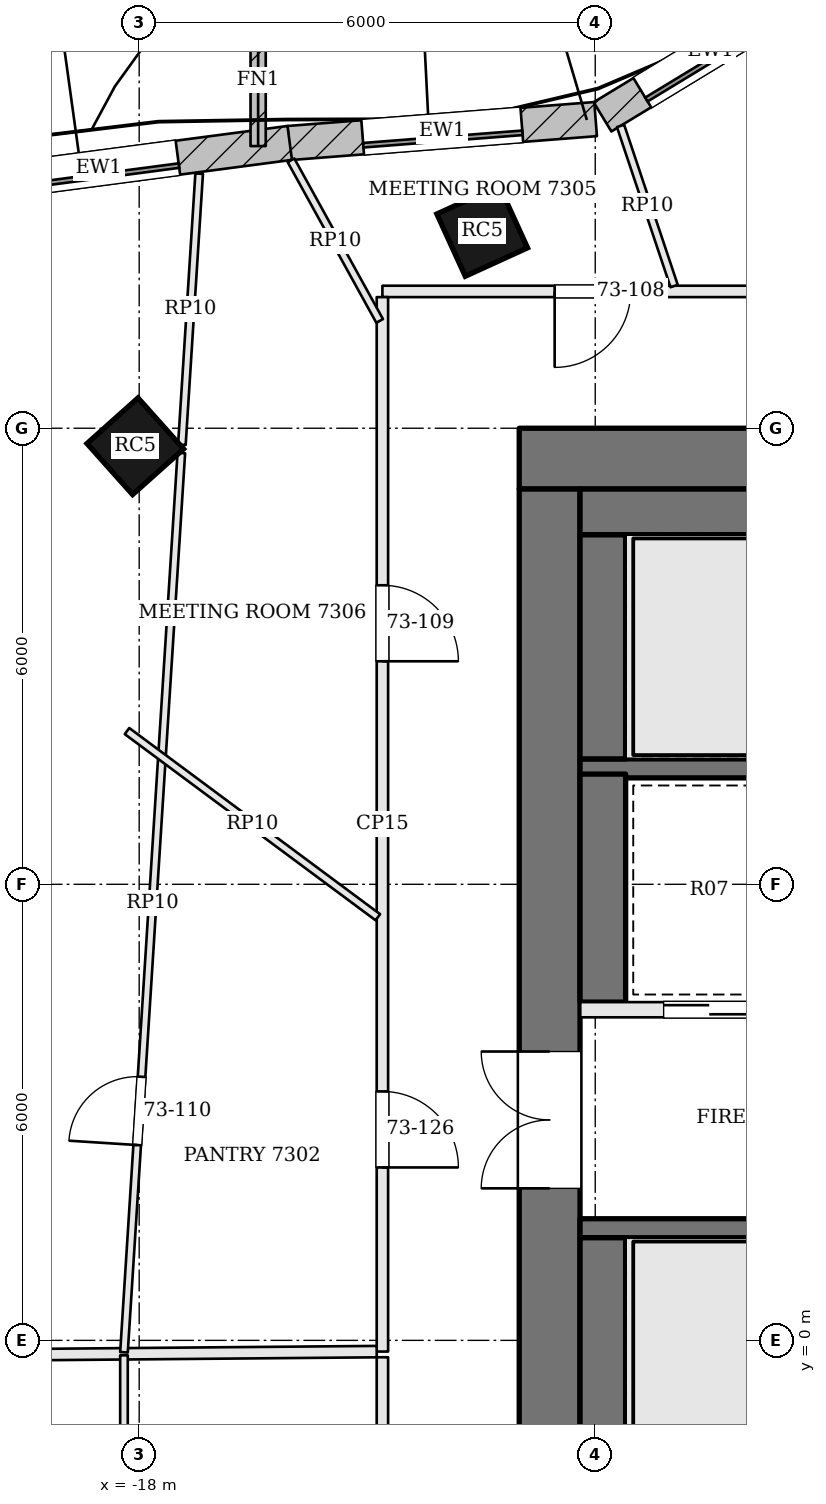
"""IFC4 building model, lengths in metres.
Left out: names, types, materials, properties, quantities, classifications, styles, units other than length and angle.
Written with IfcOpenShell. Run it as: python <this file> out.ifc"""

import sys

from ifc_helpers import new_model, si_unit, direction, frame, frame_2d, origin, origin_2d, place, context, subcontext, project, spatial, rectangle, extrude, element, fill, save


model = new_model("IFC4")
c1 = context("Model", 3, precision=1e-05, world=origin(), true_north=direction((0.0, 1.0)))
c2 = subcontext(c1, "Body", "Model", "MODEL_VIEW")
j1 = project(units=[si_unit("LENGTHUNIT", "METRE"), si_unit("PLANEANGLEUNIT", "RADIAN")], contexts=[c1])
p1 = place(None, origin())
s1 = spatial("IfcSite", under=j1, at=p1, CompositionType="ELEMENT")
p2 = place(p1, origin())
s2 = spatial("IfcBuilding", under=s1, at=p2, CompositionType="ELEMENT")
p3 = place(p2, frame((0.0, 0.0, 296.1)))
s3 = spatial("IfcBuildingStorey", under=s2, at=p3, CompositionType="ELEMENT", Elevation=296.1)
p4 = place(p3, frame((-13.0, 11.6, 0.0), z_axis=(0.0, 0.0, 1.0), x_axis=(1.0, 0.0, 0.0)))
e1 = element("IfcWall", 1, at=p4, inside=s3, PredefinedType="SHEAR", context=c2, shape_type="SweptSolid", body=[
    extrude(rectangle(XDim=26.0, YDim=0.8, at=frame_2d((13.0, 0.0))), origin(), (0.0, 0.0, 1.0), 3.9),
])
p5 = place(p4, frame((8.825, 0.0, 0.0)))
e2 = element("IfcOpeningElement", 2, at=p5, cuts=e1, PredefinedType="OPENING", context=c2, shape_type="SweptSolid", body=[
    extrude(rectangle(XDim=1.0, YDim=2.1, at=frame_2d((0.5, 1.05))), frame((0.0, 0.41, 0.0), z_axis=(0.0, -1.0, 0.0), x_axis=(1.0, 0.0, 0.0)), (0.0, 0.0, 1.0), 0.82),
])
p6 = place(p4, frame((11.825, 0.0, 0.0)))
e3 = element("IfcOpeningElement", 3, at=p6, cuts=e1, PredefinedType="OPENING", context=c2, shape_type="SweptSolid", body=[
    extrude(rectangle(XDim=0.7, YDim=2.1, at=frame_2d((0.35, 1.05))), frame((0.0, 0.41, 0.0), z_axis=(0.0, -1.0, 0.0), x_axis=(1.0, 0.0, 0.0)), (0.0, 0.0, 1.0), 0.82),
])
p7 = place(p4, frame((14.275, 0.0, 0.0)))
e4 = element("IfcOpeningElement", 4, at=p7, cuts=e1, PredefinedType="OPENING", context=c2, shape_type="SweptSolid", body=[
    extrude(rectangle(XDim=0.7, YDim=2.1, at=frame_2d((0.35, 1.05))), frame((0.0, 0.41, 0.0), z_axis=(0.0, -1.0, 0.0), x_axis=(1.0, 0.0, 0.0)), (0.0, 0.0, 1.0), 0.82),
])
p8 = place(p4, frame((16.175, 0.0, 0.0)))
e5 = element("IfcOpeningElement", 5, at=p8, cuts=e1, PredefinedType="OPENING", context=c2, shape_type="SweptSolid", body=[
    extrude(rectangle(XDim=1.0, YDim=2.1, at=frame_2d((0.5, 1.05))), frame((0.0, 0.41, 0.0), z_axis=(0.0, -1.0, 0.0), x_axis=(1.0, 0.0, 0.0)), (0.0, 0.0, 1.0), 0.82),
])
p9 = place(p3, frame((-12.6, -2.2, 0.0), z_axis=(0.0, 0.0, 1.0), x_axis=(0.0, 1.0, 0.0)))
e6 = element("IfcWall", 6, at=p9, inside=s3, PredefinedType="SHEAR", context=c2, shape_type="SweptSolid", body=[
    extrude(rectangle(XDim=13.4, YDim=0.8, at=frame_2d((6.7, 0.0))), origin(), (0.0, 0.0, 1.0), 3.9),
])
p10 = place(p9, frame((4.2, 0.0, 0.0)))
e7 = element("IfcOpeningElement", 7, at=p10, cuts=e6, PredefinedType="OPENING", context=c2, shape_type="SweptSolid", body=[
    extrude(rectangle(XDim=1.8, YDim=2.1, at=frame_2d((0.9, 1.05))), frame((0.0, 0.41, 0.0), z_axis=(0.0, -1.0, 0.0), x_axis=(1.0, 0.0, 0.0)), (0.0, 0.0, 1.0), 0.82),
])
for number, where, z_axis, x_axis in (
    (8, (-13.487, 14.596, 0.0), (0.0, 0.0, 1.0), (-0.91, -0.415, 0.0)),
    (9, (-18.051, 11.763, 0.0), (0.0, 0.0, 1.0), (-0.746, -0.666, 0.0)),
):
    element("IfcColumn", number, at=place(p3, frame(where, z_axis=z_axis, x_axis=x_axis)), inside=s3, PredefinedType="COLUMN", context=c2, shape_type="SweptSolid", body=[
        extrude(rectangle(XDim=0.9, YDim=0.9, at=origin_2d()), origin(), (0.0, 0.0, 1.0), 3.9),
    ])
p11 = place(p3, frame((-9.063, 17.823, 0.0), z_axis=(0.0, 0.0, 1.0), x_axis=(-0.854622263029, -0.519250216693, 0.0)))
e10 = element("IfcWall", 10, at=p11, inside=s3, PredefinedType="SOLIDWALL", context=c2, shape_type="SweptSolid", body=[
    extrude(rectangle(XDim=3.325, YDim=0.45, at=frame_2d((1.662, 0.0))), origin(), (0.0, 0.0, 1.0), 3.7),
])
p12 = place(p11, frame((0.612, 0.0, 0.9)))
e11 = element("IfcOpeningElement", 11, at=p12, cuts=e10, PredefinedType="OPENING", context=c2, shape_type="SweptSolid", body=[
    extrude(rectangle(XDim=2.1, YDim=2.3, at=frame_2d((1.05, 1.15))), frame((0.0, 0.235, 0.0), z_axis=(0.0, -1.0, 0.0), x_axis=(1.0, 0.0, 0.0)), (0.0, 0.0, 1.0), 0.47),
])
p13 = place(p3, frame((-11.995, 16.067, 0.0), z_axis=(0.0, 0.0, 1.0), x_axis=(-0.996967993416, -0.077812724559, 0.0)))
e12 = element("IfcWall", 12, at=p13, inside=s3, PredefinedType="SOLIDWALL", context=c2, shape_type="SweptSolid", body=[
    extrude(rectangle(XDim=4.047, YDim=0.45, at=frame_2d((2.024, 0.0))), origin(), (0.0, 0.0, 1.0), 3.7),
])
p14 = place(p13, frame((0.974, 0.0, 0.9)))
e13 = element("IfcOpeningElement", 13, at=p14, cuts=e12, PredefinedType="OPENING", context=c2, shape_type="SweptSolid", body=[
    extrude(rectangle(XDim=2.1, YDim=2.3, at=frame_2d((1.05, 1.15))), frame((0.0, 0.235, 0.0), z_axis=(0.0, -1.0, 0.0), x_axis=(1.0, 0.0, 0.0)), (0.0, 0.0, 1.0), 0.47),
])
p15 = place(p3, frame((-16.019, 15.753, 0.0), z_axis=(0.0, 0.0, 1.0), x_axis=(-0.991409967396, -0.130790965086, 0.0)))
e14 = element("IfcWall", 14, at=p15, inside=s3, PredefinedType="SOLIDWALL", context=c2, shape_type="SweptSolid", body=[
    extrude(rectangle(XDim=5.068, YDim=0.45, at=frame_2d((2.534, 0.0))), origin(), (0.0, 0.0, 1.0), 3.7),
])
p16 = place(p15, frame((1.484, 0.0, 0.9)))
e15 = element("IfcOpeningElement", 15, at=p16, cuts=e14, PredefinedType="OPENING", context=c2, shape_type="SweptSolid", body=[
    extrude(rectangle(XDim=2.1, YDim=2.3, at=frame_2d((1.05, 1.15))), frame((0.0, 0.235, 0.0), z_axis=(0.0, -1.0, 0.0), x_axis=(1.0, 0.0, 0.0)), (0.0, 0.0, 1.0), 0.47),
])
p17 = place(p3, frame((-16.435, 15.712, 0.0), z_axis=(0.0, 0.0, 1.0), x_axis=(0.000279017846, 0.999999961075, 0.0)))
e16 = element("IfcWall", 16, at=p17, inside=s3, PredefinedType="SOLIDWALL", context=c2, shape_type="SweptSolid", body=[
    extrude(rectangle(XDim=1.75, YDim=0.2, at=frame_2d((0.875, 0.0))), origin(), (0.0, 0.0, 1.0), 3.7),
])
p18 = place(p3, frame((-12.2, 1.475, 0.0), z_axis=(0.0, 0.0, 1.0), x_axis=(1.0, 0.0, 0.0)))
e17 = element("IfcWall", 17, at=p18, inside=s3, PredefinedType="SOLIDWALL", context=c2, shape_type="SweptSolid", body=[
    extrude(rectangle(XDim=7.1, YDim=0.25, at=frame_2d((3.55, 0.0))), origin(), (0.0, 0.0, 1.0), 3.7),
])
p19 = place(p18, frame((5.8, 0.0, 0.0)))
e18 = element("IfcOpeningElement", 18, at=p19, cuts=e17, PredefinedType="OPENING", context=c2, shape_type="SweptSolid", body=[
    extrude(rectangle(XDim=1.2, YDim=2.1, at=frame_2d((0.6, 1.05))), frame((0.0, 0.135, 0.0), z_axis=(0.0, -1.0, 0.0), x_axis=(1.0, 0.0, 0.0)), (0.0, 0.0, 1.0), 0.27),
])
p20 = place(p3, frame((-12.2, 4.35, 0.0), z_axis=(0.0, 0.0, 1.0), x_axis=(1.0, 0.0, 0.0)))
e19 = element("IfcWall", 19, at=p20, inside=s3, PredefinedType="SOLIDWALL", context=c2, shape_type="SweptSolid", body=[
    extrude(rectangle(XDim=7.1, YDim=0.2, at=frame_2d((3.55, 0.0))), origin(), (0.0, 0.0, 1.0), 3.7),
])
p21 = place(p20, frame((4.4, 0.0, 0.0)))
e20 = element("IfcOpeningElement", 20, at=p21, cuts=e19, PredefinedType="OPENING", context=c2, shape_type="SweptSolid", body=[
    extrude(rectangle(XDim=1.2, YDim=2.1, at=frame_2d((0.6, 1.05))), frame((0.0, 0.11, 0.0), z_axis=(0.0, -1.0, 0.0), x_axis=(1.0, 0.0, 0.0)), (0.0, 0.0, 1.0), 0.22),
])
p22 = place(p20, frame((1.1, 0.0, 0.0)))
e21 = element("IfcOpeningElement", 21, at=p22, cuts=e19, PredefinedType="OPENING", context=c2, shape_type="SweptSolid", body=[
    extrude(rectangle(XDim=1.2, YDim=2.1, at=frame_2d((0.6, 1.05))), frame((0.0, 0.11, 0.0), z_axis=(0.0, -1.0, 0.0), x_axis=(1.0, 0.0, 0.0)), (0.0, 0.0, 1.0), 0.22),
])
p23 = place(p3, frame((-12.2, 7.525, 0.0), z_axis=(0.0, 0.0, 1.0), x_axis=(1.0, 0.0, 0.0)))
e22 = element("IfcWall", 22, at=p23, inside=s3, PredefinedType="SOLIDWALL", context=c2, shape_type="SweptSolid", body=[
    extrude(rectangle(XDim=7.1, YDim=0.25, at=frame_2d((3.55, 0.0))), origin(), (0.0, 0.0, 1.0), 3.7),
])
p24 = place(p23, frame((5.8, 0.0, 0.0)))
e23 = element("IfcOpeningElement", 23, at=p24, cuts=e22, PredefinedType="OPENING", context=c2, shape_type="SweptSolid", body=[
    extrude(rectangle(XDim=1.2, YDim=2.1, at=frame_2d((0.6, 1.05))), frame((0.0, 0.135, 0.0), z_axis=(0.0, -1.0, 0.0), x_axis=(1.0, 0.0, 0.0)), (0.0, 0.0, 1.0), 0.27),
])
p25 = place(p3, frame((-11.9, -1.6, 0.0), z_axis=(0.0, 0.0, 1.0), x_axis=(0.0, 1.0, 0.0)))
e24 = element("IfcWall", 24, at=p25, inside=s3, PredefinedType="SOLIDWALL", context=c2, shape_type="SweptSolid", body=[
    extrude(rectangle(XDim=2.95, YDim=0.6, at=frame_2d((1.475, 0.0))), origin(), (0.0, 0.0, 1.0), 3.7),
])
p26 = place(p3, frame((-11.9, 4.45, 0.0), z_axis=(0.0, 0.0, 1.0), x_axis=(0.0, 1.0, 0.0)))
e25 = element("IfcWall", 25, at=p26, inside=s3, PredefinedType="SOLIDWALL", context=c2, shape_type="SweptSolid", body=[
    extrude(rectangle(XDim=3.0, YDim=0.6, at=frame_2d((1.5, 0.0))), origin(), (0.0, 0.0, 1.0), 3.7),
])
p27 = place(p3, frame((-11.9, 7.65, 0.0), z_axis=(0.0, 0.0, 1.0), x_axis=(0.0, 1.0, 0.0)))
e26 = element("IfcWall", 26, at=p27, inside=s3, PredefinedType="SOLIDWALL", context=c2, shape_type="SweptSolid", body=[
    extrude(rectangle(XDim=2.95, YDim=0.6, at=frame_2d((1.475, 0.0))), origin(), (0.0, 0.0, 1.0), 3.7),
])
p28 = place(p3, frame((-12.2, 10.9, 0.0), z_axis=(0.0, 0.0, 1.0), x_axis=(1.0, 0.0, 0.0)))
e27 = element("IfcWall", 27, at=p28, inside=s3, PredefinedType="SOLIDWALL", context=c2, shape_type="SweptSolid", body=[
    extrude(rectangle(XDim=7.1, YDim=0.6, at=frame_2d((3.55, 0.0))), origin(), (0.0, 0.0, 1.0), 3.7),
])
p29 = place(p3, frame((-0.184, 13.8, 0.0), z_axis=(0.0, 0.0, 1.0), x_axis=(-1.0, 0.0, 0.0)))
e28 = element("IfcWall", 28, at=p29, inside=s3, PredefinedType="PARTITIONING", context=c2, shape_type="SweptSolid", body=[
    extrude(rectangle(XDim=14.616, YDim=0.15, at=frame_2d((7.308, 0.0))), origin(), (0.0, 0.0, 1.0), 3.198),
])
p30 = place(p29, frame((4.44, 0.0, 0.0)))
e29 = element("IfcOpeningElement", 29, at=p30, cuts=e28, PredefinedType="OPENING", context=c2, shape_type="SweptSolid", body=[
    extrude(rectangle(XDim=1.8, YDim=2.1, at=frame_2d((0.9, 1.05))), frame((0.0, 0.085, 0.0), z_axis=(0.0, -1.0, 0.0), x_axis=(1.0, 0.0, 0.0)), (0.0, 0.0, 1.0), 0.17),
])
p31 = place(p29, frame((11.35, 0.0, 0.0)))
e30 = element("IfcOpeningElement", 30, at=p31, cuts=e28, PredefinedType="OPENING", context=c2, shape_type="SweptSolid", body=[
    extrude(rectangle(XDim=1.0, YDim=2.4, at=frame_2d((0.5, 1.2))), frame((0.0, 0.085, 0.0), z_axis=(0.0, -1.0, 0.0), x_axis=(1.0, 0.0, 0.0)), (0.0, 0.0, 1.0), 0.17),
])
p32 = place(p3, frame((-14.8, 13.725, 0.0), z_axis=(0.0, 0.0, 1.0), x_axis=(0.0, -1.0, 0.0)))
e31 = element("IfcWall", 31, at=p32, inside=s3, PredefinedType="PARTITIONING", context=c2, shape_type="SweptSolid", body=[
    extrude(rectangle(XDim=13.872, YDim=0.15, at=frame_2d((6.936, 0.0))), origin(), (0.0, 0.0, 1.0), 3.198),
])
p33 = place(p32, frame((3.791, 0.0, 0.0)))
e32 = element("IfcOpeningElement", 32, at=p33, cuts=e31, PredefinedType="OPENING", context=c2, shape_type="SweptSolid", body=[
    extrude(rectangle(XDim=1.0, YDim=2.4, at=frame_2d((0.5, 1.2))), frame((0.0, 0.085, 0.0), z_axis=(0.0, -1.0, 0.0), x_axis=(1.0, 0.0, 0.0)), (0.0, 0.0, 1.0), 0.17),
])
p34 = place(p32, frame((10.45, 0.0, 0.0)))
e33 = element("IfcOpeningElement", 33, at=p34, cuts=e31, PredefinedType="OPENING", context=c2, shape_type="SweptSolid", body=[
    extrude(rectangle(XDim=1.0, YDim=2.1, at=frame_2d((0.5, 1.05))), frame((0.0, 0.085, 0.0), z_axis=(0.0, -1.0, 0.0), x_axis=(1.0, 0.0, 0.0)), (0.0, 0.0, 1.0), 0.17),
])
p35 = place(p3, frame((-24.384, -0.231, 0.0), z_axis=(0.0, 0.0, 1.0), x_axis=(0.999962123102, 0.008703583232, 0.0)))
e34 = element("IfcWall", 34, at=p35, inside=s3, PredefinedType="PARTITIONING", context=c2, shape_type="SweptSolid", body=[
    extrude(rectangle(XDim=9.509, YDim=0.15, at=frame_2d((4.754, 0.0))), origin(), (0.0, 0.0, 1.0), 3.234),
])
p36 = place(p3, frame((-14.8, -0.222, 0.0), z_axis=(0.0, 0.0, 1.0), x_axis=(0.0, -1.0, 0.0)))
e35 = element("IfcWall", 35, at=p36, inside=s3, PredefinedType="PARTITIONING", context=c2, shape_type="SweptSolid", body=[
    extrude(rectangle(XDim=4.578, YDim=0.15, at=frame_2d((2.289, 0.0))), origin(), (0.0, 0.0, 1.0), 3.198),
])
p37 = place(p36, frame((1.24, 0.0, 0.0)))
e36 = element("IfcOpeningElement", 36, at=p37, cuts=e35, PredefinedType="OPENING", context=c2, shape_type="SweptSolid", body=[
    extrude(rectangle(XDim=1.0, YDim=2.1, at=frame_2d((0.5, 1.05))), frame((0.0, 0.085, 0.0), z_axis=(0.0, -1.0, 0.0), x_axis=(1.0, 0.0, 0.0)), (0.0, 0.0, 1.0), 0.17),
])
p38 = place(p3, frame((-18.2, -0.157, 0.0), z_axis=(0.0, 0.0, 1.0), x_axis=(0.063656514624, 0.997971867412, 0.0)))
e37 = element("IfcWall", 37, at=p38, inside=s3, PredefinedType="PARTITIONING", context=c2, shape_type="SweptSolid", body=[
    extrude(rectangle(XDim=11.855, YDim=0.1, at=frame_2d((5.927, 0.0))), origin(), (0.0, 0.0, 1.0), 3.184),
])
p39 = place(p38, frame((2.732, 0.0, 0.0)))
e38 = element("IfcOpeningElement", 38, at=p39, cuts=e37, PredefinedType="OPENING", context=c2, shape_type="SweptSolid", body=[
    extrude(rectangle(XDim=0.9, YDim=2.1, at=frame_2d((0.45, 1.05))), frame((0.0, 0.06, 0.0), z_axis=(0.0, -1.0, 0.0), x_axis=(1.0, 0.0, 0.0)), (0.0, 0.0, 1.0), 0.12),
])
p40 = place(p3, frame((-17.438, 11.783, 0.0), z_axis=(0.0, 0.0, 1.0), x_axis=(0.063671201207, 0.997970930507, 0.0)))
e39 = element("IfcWall", 39, at=p40, inside=s3, PredefinedType="PARTITIONING", context=c2, shape_type="SweptSolid", body=[
    extrude(rectangle(XDim=3.574, YDim=0.1, at=frame_2d((1.787, 0.0))), origin(), (0.0, 0.0, 1.0), 3.184),
])
p41 = place(p3, frame((-10.962, 13.871, 0.0), z_axis=(0.0, 0.0, 1.0), x_axis=(-0.317447611302, 0.948275811185, 0.0)))
e40 = element("IfcWall", 40, at=p41, inside=s3, PredefinedType="PARTITIONING", context=c2, shape_type="SweptSolid", body=[
    extrude(rectangle(XDim=2.221, YDim=0.1, at=frame_2d((1.111, 0.0))), origin(), (0.0, 0.0, 1.0), 3.184),
])
p42 = place(p3, frame((-14.836, 13.412, 0.0), z_axis=(0.0, 0.0, 1.0), x_axis=(-0.483304666726, 0.875452225493, 0.0)))
e41 = element("IfcWall", 41, at=p42, inside=s3, PredefinedType="PARTITIONING", context=c2, shape_type="SweptSolid", body=[
    extrude(rectangle(XDim=2.413, YDim=0.1, at=frame_2d((1.207, 0.0))), origin(), (0.0, 0.0, 1.0), 3.184),
])
p43 = place(p3, frame((-14.86, 5.567, 0.0), z_axis=(0.0, 0.0, 1.0), x_axis=(-0.803012729879, 0.595961874328, 0.0)))
e42 = element("IfcWall", 42, at=p43, inside=s3, PredefinedType="PARTITIONING", context=c2, shape_type="SweptSolid", body=[
    extrude(rectangle(XDim=4.109, YDim=0.1, at=frame_2d((2.055, 0.0))), origin(), (0.0, 0.0, 1.0), 3.184),
])
p44 = place(p3, frame((-18.2, -8.2, 0.0), z_axis=(0.0, 0.0, 1.0), x_axis=(0.0, 1.0, 0.0)))
e43 = element("IfcWall", 43, at=p44, inside=s3, PredefinedType="PARTITIONING", context=c2, shape_type="SweptSolid", body=[
    extrude(rectangle(XDim=8.003, YDim=0.1, at=frame_2d((4.001, 0.0))), origin(), (0.0, 0.0, 1.0), 3.184),
])
p45 = place(p44, frame((5.355, 0.0, 0.0)))
e44 = element("IfcOpeningElement", 44, at=p45, cuts=e43, PredefinedType="OPENING", context=c2, shape_type="SweptSolid", body=[
    extrude(rectangle(XDim=1.0, YDim=2.1, at=frame_2d((0.5, 1.05))), frame((0.0, 0.06, 0.0), z_axis=(0.0, -1.0, 0.0), x_axis=(1.0, 0.0, 0.0)), (0.0, 0.0, 1.0), 0.12),
])
p46 = place(p12, origin())
e45 = element("IfcWindow", 45, at=p46, inside=s3, PartitioningType="SINGLE_PANEL", PredefinedType="WINDOW", context=c2, shape_type="SweptSolid", body=[
    extrude(rectangle(XDim=2.1, YDim=2.3, at=frame_2d((1.05, 1.15))), frame((0.0, 0.135, 0.0), z_axis=(0.0, -1.0, 0.0), x_axis=(1.0, 0.0, 0.0)), (0.0, 0.0, 1.0), 0.06),
])
fill(e11, e45)
p47 = place(p14, origin())
e46 = element("IfcWindow", 46, at=p47, inside=s3, PartitioningType="SINGLE_PANEL", PredefinedType="WINDOW", context=c2, shape_type="SweptSolid", body=[
    extrude(rectangle(XDim=2.1, YDim=2.3, at=frame_2d((1.05, 1.15))), frame((0.0, 0.135, 0.0), z_axis=(0.0, -1.0, 0.0), x_axis=(1.0, 0.0, 0.0)), (0.0, 0.0, 1.0), 0.06),
])
fill(e13, e46)
p48 = place(p16, origin())
e47 = element("IfcWindow", 47, at=p48, inside=s3, PartitioningType="SINGLE_PANEL", PredefinedType="WINDOW", context=c2, shape_type="SweptSolid", body=[
    extrude(rectangle(XDim=2.1, YDim=2.3, at=frame_2d((1.05, 1.15))), frame((0.0, 0.135, 0.0), z_axis=(0.0, -1.0, 0.0), x_axis=(1.0, 0.0, 0.0)), (0.0, 0.0, 1.0), 0.06),
])
fill(e15, e47)
p49 = place(p10, origin())
e48 = element("IfcDoor", 48, at=p49, inside=s3, OperationType="DOUBLE_DOOR_SINGLE_SWING", PredefinedType="DOOR", context=c2, shape_type="SweptSolid", body=[
    extrude(rectangle(XDim=1.8, YDim=2.1, at=frame_2d((0.9, 1.05))), frame((0.0, 0.025, 0.0), z_axis=(0.0, -1.0, 0.0), x_axis=(1.0, 0.0, 0.0)), (0.0, 0.0, 1.0), 0.05),
])
fill(e7, e48)
p50 = place(p22, origin())
e49 = element("IfcDoor", 49, at=p50, inside=s3, OperationType="SLIDING_TO_RIGHT", PredefinedType="DOOR", context=c2, shape_type="SweptSolid", body=[
    extrude(rectangle(XDim=1.2, YDim=2.1, at=frame_2d((0.6, 1.05))), frame((0.0, 0.025, 0.0), z_axis=(0.0, -1.0, 0.0), x_axis=(1.0, 0.0, 0.0)), (0.0, 0.0, 1.0), 0.05),
])
fill(e21, e49)
p51 = place(p31, origin())
e50 = element("IfcDoor", 50, at=p51, inside=s3, OperationType="SINGLE_SWING_RIGHT", PredefinedType="DOOR", context=c2, shape_type="SweptSolid", body=[
    extrude(rectangle(XDim=1.0, YDim=2.4, at=frame_2d((0.5, 1.2))), frame((0.0, 0.025, 0.0), z_axis=(0.0, -1.0, 0.0), x_axis=(1.0, 0.0, 0.0)), (0.0, 0.0, 1.0), 0.05),
])
fill(e30, e50)
p52 = place(p33, origin())
e51 = element("IfcDoor", 51, at=p52, inside=s3, OperationType="SINGLE_SWING_RIGHT", PredefinedType="DOOR", context=c2, shape_type="SweptSolid", body=[
    extrude(rectangle(XDim=1.0, YDim=2.4, at=frame_2d((0.5, 1.2))), frame((0.0, 0.025, 0.0), z_axis=(0.0, -1.0, 0.0), x_axis=(1.0, 0.0, 0.0)), (0.0, 0.0, 1.0), 0.05),
])
fill(e32, e51)
p53 = place(p39, origin())
e52 = element("IfcDoor", 52, at=p53, inside=s3, OperationType="SINGLE_SWING_LEFT", PredefinedType="DOOR", context=c2, shape_type="SweptSolid", body=[
    extrude(rectangle(XDim=0.9, YDim=2.1, at=frame_2d((0.45, 1.05))), frame((0.0, 0.025, 0.0), z_axis=(0.0, -1.0, 0.0), x_axis=(1.0, 0.0, 0.0)), (0.0, 0.0, 1.0), 0.05),
])
fill(e38, e52)
p54 = place(p34, origin())
e53 = element("IfcDoor", 53, at=p54, inside=s3, OperationType="SINGLE_SWING_RIGHT", PredefinedType="DOOR", context=c2, shape_type="SweptSolid", body=[
    extrude(rectangle(XDim=1.0, YDim=2.1, at=frame_2d((0.5, 1.05))), frame((0.0, 0.025, 0.0), z_axis=(0.0, -1.0, 0.0), x_axis=(1.0, 0.0, 0.0)), (0.0, 0.0, 1.0), 0.05),
])
fill(e33, e53)
save(model, sys.argv[1])
